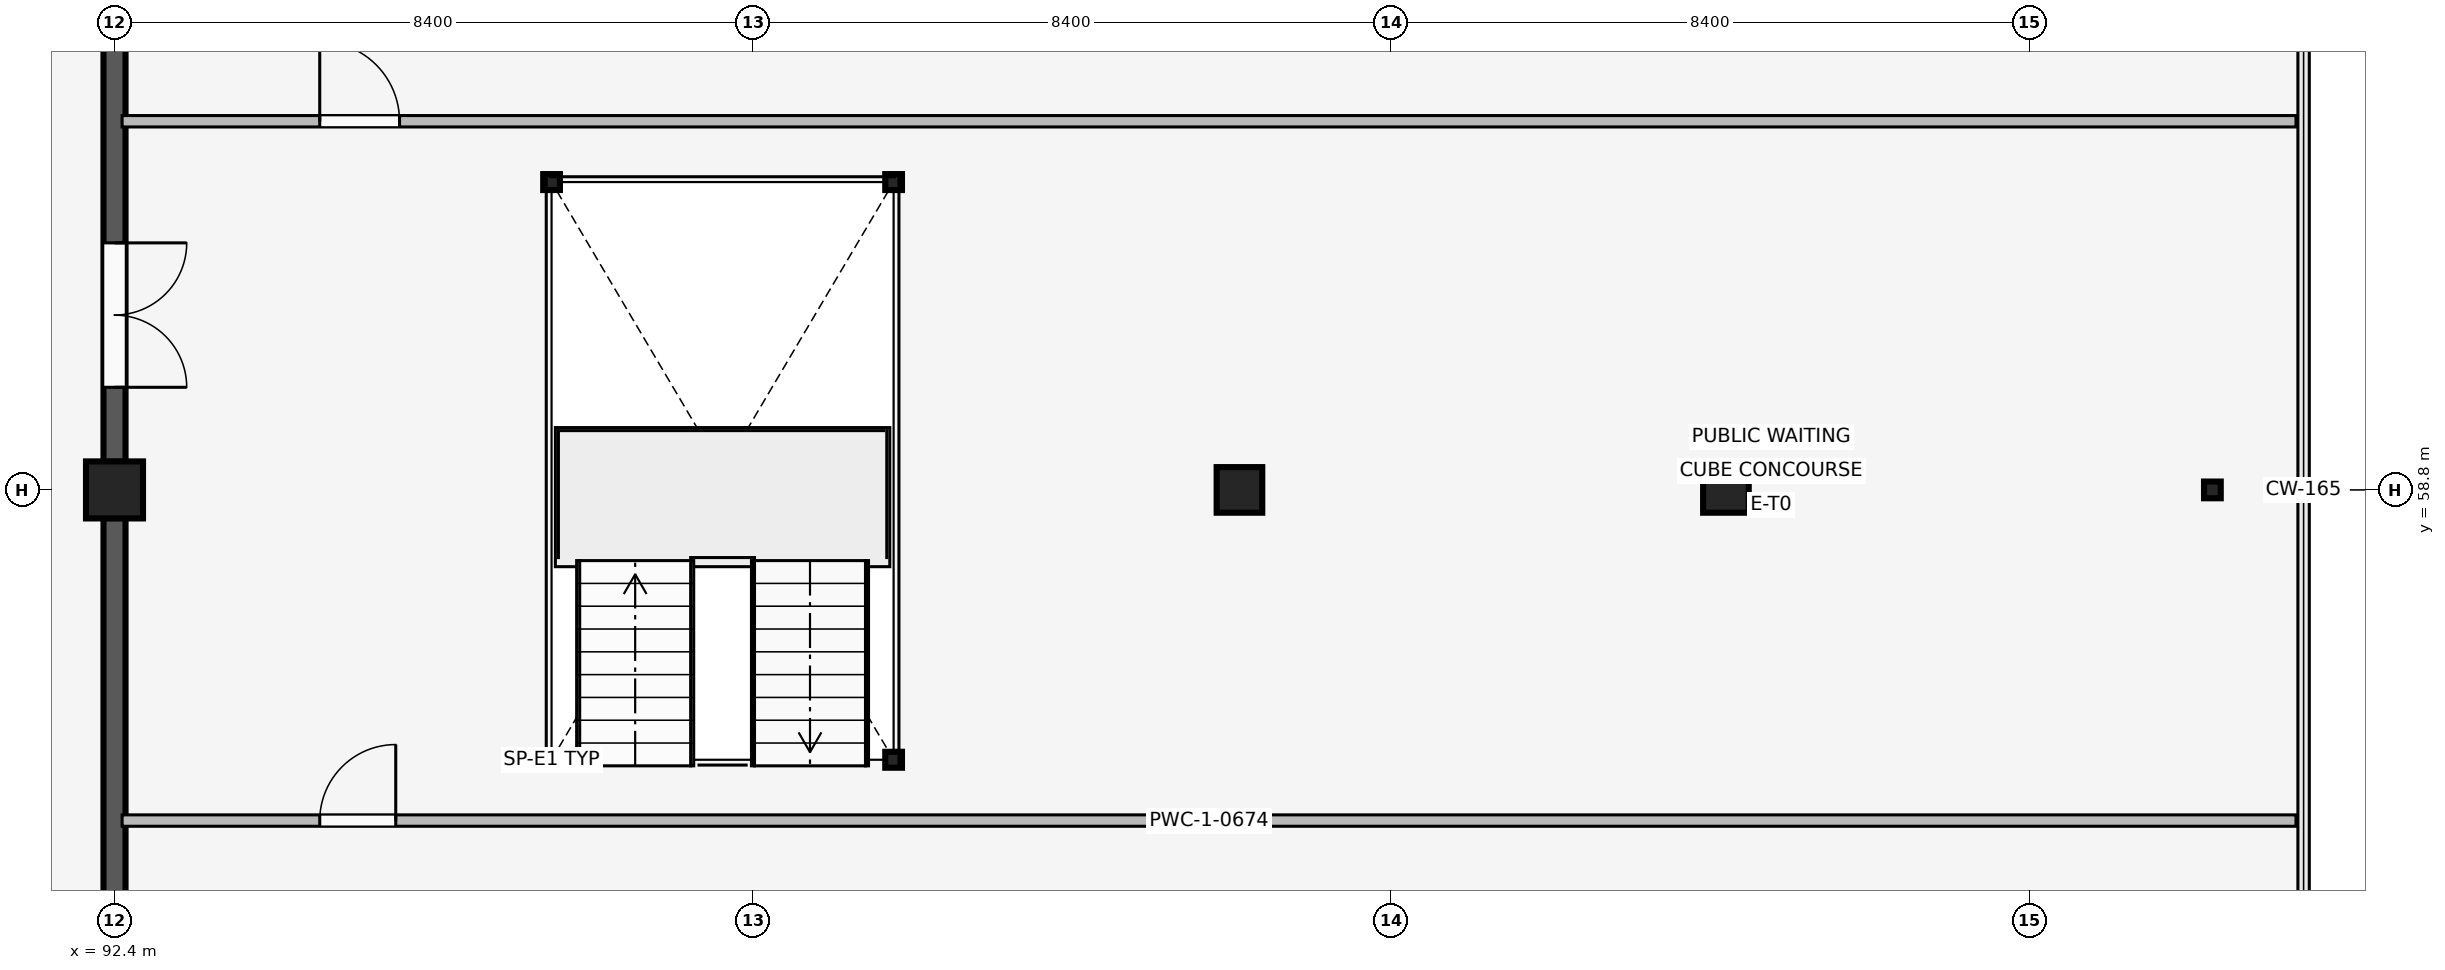
"""IFC4 building model, lengths in metres.
Left out: names, types, materials, properties, quantities, classifications, styles, units other than length and angle.
Written with IfcOpenShell. Run it as: python <this file> out.ifc"""

import sys

from ifc_helpers import new_model, si_unit, direction, frame, frame_2d, origin, origin_2d, place, context, subcontext, project, spatial, rectangle, i_section, extrude, element, fill, save


model = new_model("IFC4")
c1 = context("Model", 3, precision=1e-05, world=origin(), true_north=direction((0.0, 1.0)))
c2 = subcontext(c1, "Body", "Model", "MODEL_VIEW")
j1 = project(units=[si_unit("LENGTHUNIT", "METRE"), si_unit("PLANEANGLEUNIT", "RADIAN")], contexts=[c1])
p1 = place(None, origin())
s1 = spatial("IfcSite", under=j1, at=p1, CompositionType="ELEMENT")
p2 = place(p1, origin())
s2 = spatial("IfcBuilding", under=s1, at=p2, CompositionType="ELEMENT")
p3 = place(p2, frame((0.0, 0.0, 4.8)))
s3 = spatial("IfcBuildingStorey", under=s2, at=p3, CompositionType="ELEMENT", Elevation=4.8)
p4 = place(p3, frame((92.4, 58.8, 0.0), z_axis=(0.0, 0.0, 1.0), x_axis=(1.0, 0.0, 0.0)))
e1 = element("IfcColumn", 1, at=p4, inside=s3, PredefinedType="COLUMN", context=c2, shape_type="SweptSolid", body=[
    extrude(rectangle(XDim=0.75, YDim=0.75, at=origin_2d()), origin(), (0.0, 0.0, 1.0), 3.3),
])
for number, where, z_axis, x_axis in (
    (2, (107.2, 58.8, 0.0), (0.0, 0.0, 1.0), (1.0, 0.0, 0.0)),
    (3, (113.6, 58.8, 0.0), (0.0, 0.0, 1.0), (1.0, 0.0, 0.0)),
):
    element("IfcColumn", number, at=place(p3, frame(where, z_axis=z_axis, x_axis=x_axis)), inside=s3, PredefinedType="COLUMN", context=c2, shape_type="SweptSolid", body=[
        extrude(rectangle(XDim=0.6, YDim=0.6, at=origin_2d()), origin(), (0.0, 0.0, 1.0), 3.3),
    ])
p5 = place(p3, frame((120.0, 58.8, 0.0), z_axis=(0.0, 0.0, 1.0), x_axis=(1.0, 0.0, 0.0)))
e4 = element("IfcColumn", 4, at=p5, inside=s3, PredefinedType="COLUMN", context=c2, shape_type="SweptSolid", body=[
    extrude(i_section(OverallWidth=0.22, OverallDepth=0.22, WebThickness=0.01, FlangeThickness=0.016, at=origin_2d()), origin(), (0.0, 0.0, 1.0), 3.3),
])
for number, where, z_axis, x_axis in (
    (5, (98.15, 55.25, 0.0), (0.0, 0.0, 1.0), (1.0, 0.0, 0.0)),
    (6, (102.65, 55.25, 0.0), (0.0, 0.0, 1.0), (1.0, 0.0, 0.0)),
    (7, (98.15, 62.85, 0.0), (0.0, 0.0, 1.0), (1.0, 0.0, 0.0)),
    (8, (102.65, 62.85, 0.0), (0.0, 0.0, 1.0), (1.0, 0.0, 0.0)),
):
    element("IfcColumn", number, at=place(p3, frame(where, z_axis=z_axis, x_axis=x_axis)), inside=s3, PredefinedType="COLUMN", context=c2, shape_type="SweptSolid", body=[
        extrude(i_section(OverallWidth=0.22, OverallDepth=0.21, WebThickness=0.007, FlangeThickness=0.011, at=origin_2d()), origin(), (0.0, 0.0, 1.0), 3.3),
    ])
p6 = place(p3, frame((92.4, 58.43, 0.0), z_axis=(0.0, 0.0, 1.0), x_axis=(0.0, -1.0, 0.0)))
e9 = element("IfcWall", 9, at=p6, inside=s3, PredefinedType="SOLIDWALL", context=c2, shape_type="SweptSolid", body=[
    extrude(rectangle(XDim=7.66, YDim=0.29, at=frame_2d((3.83, 0.0))), origin(), (0.0, 0.0, 1.0), 2.42),
])
p7 = place(p3, frame((92.4, 66.83, 0.0), z_axis=(0.0, 0.0, 1.0), x_axis=(0.0, -1.0, 0.0)))
e10 = element("IfcWall", 10, at=p7, inside=s3, PredefinedType="SOLIDWALL", context=c2, shape_type="SweptSolid", body=[
    extrude(rectangle(XDim=7.66, YDim=0.29, at=frame_2d((3.83, 0.0))), origin(), (0.0, 0.0, 1.0), 2.42),
])
p8 = place(p7, frame((4.78, 0.0, 0.0)))
e11 = element("IfcOpeningElement", 11, at=p8, cuts=e10, PredefinedType="OPENING", context=c2, shape_type="SweptSolid", body=[
    extrude(rectangle(XDim=1.9, YDim=2.32, at=frame_2d((0.95, 1.16))), frame((0.0, 0.155, 0.0), z_axis=(0.0, -1.0, 0.0), x_axis=(1.0, 0.0, 0.0)), (0.0, 0.0, 1.0), 0.31),
])
p9 = place(p3, frame((92.5, 54.45, 0.0), z_axis=(0.0, 0.0, 1.0), x_axis=(1.0, 0.0, 0.0)))
e12 = element("IfcWall", 12, at=p9, inside=s3, PredefinedType="PARTITIONING", context=c2, shape_type="SweptSolid", body=[
    extrude(rectangle(XDim=28.6, YDim=0.15, at=frame_2d((14.3, 0.0))), origin(), (0.0, 0.0, 1.0), 2.59),
])
p10 = place(p9, frame((2.6, 0.0, 0.0)))
e13 = element("IfcOpeningElement", 13, at=p10, cuts=e12, PredefinedType="OPENING", context=c2, shape_type="SweptSolid", body=[
    extrude(rectangle(XDim=1.0, YDim=2.15, at=frame_2d((0.5, 1.075))), frame((0.0, 0.085, 0.0), z_axis=(0.0, -1.0, 0.0), x_axis=(1.0, 0.0, 0.0)), (0.0, 0.0, 1.0), 0.17),
])
p11 = place(p3, frame((92.5, 63.65, 0.0), z_axis=(0.0, 0.0, 1.0), x_axis=(1.0, 0.0, 0.0)))
e14 = element("IfcWall", 14, at=p11, inside=s3, PredefinedType="PARTITIONING", context=c2, shape_type="SweptSolid", body=[
    extrude(rectangle(XDim=28.6, YDim=0.15, at=frame_2d((14.3, 0.0))), origin(), (0.0, 0.0, 1.0), 2.59),
])
p12 = place(p11, frame((2.6, 0.0, 0.0)))
e15 = element("IfcOpeningElement", 15, at=p12, cuts=e14, PredefinedType="OPENING", context=c2, shape_type="SweptSolid", body=[
    extrude(rectangle(XDim=1.05, YDim=2.2, at=frame_2d((0.525, 1.1))), frame((0.0, 0.085, 0.0), z_axis=(0.0, -1.0, 0.0), x_axis=(1.0, 0.0, 0.0)), (0.0, 0.0, 1.0), 0.17),
])
p13 = place(p8, origin())
e16 = element("IfcDoor", 16, at=p13, inside=s3, OperationType="DOUBLE_SWING_LEFT", PredefinedType="DOOR", context=c2, shape_type="SweptSolid", body=[
    extrude(rectangle(XDim=1.9, YDim=2.32, at=frame_2d((0.95, 1.16))), frame((0.0, 0.025, 0.0), z_axis=(0.0, -1.0, 0.0), x_axis=(1.0, 0.0, 0.0)), (0.0, 0.0, 1.0), 0.05),
])
fill(e11, e16)
p14 = place(p10, origin())
e17 = element("IfcDoor", 17, at=p14, inside=s3, OperationType="SINGLE_SWING_RIGHT", PredefinedType="DOOR", context=c2, shape_type="SweptSolid", body=[
    extrude(rectangle(XDim=1.0, YDim=2.15, at=frame_2d((0.5, 1.075))), frame((0.0, 0.025, 0.0), z_axis=(0.0, -1.0, 0.0), x_axis=(1.0, 0.0, 0.0)), (0.0, 0.0, 1.0), 0.05),
])
fill(e13, e17)
p15 = place(p12, origin())
e18 = element("IfcDoor", 18, at=p15, inside=s3, OperationType="SINGLE_SWING_LEFT", PredefinedType="DOOR", context=c2, shape_type="SweptSolid", body=[
    extrude(rectangle(XDim=1.05, YDim=2.2, at=frame_2d((0.525, 1.1))), frame((0.0, 0.025, 0.0), z_axis=(0.0, -1.0, 0.0), x_axis=(1.0, 0.0, 0.0)), (0.0, 0.0, 1.0), 0.05),
])
fill(e15, e18)
save(model, sys.argv[1])
